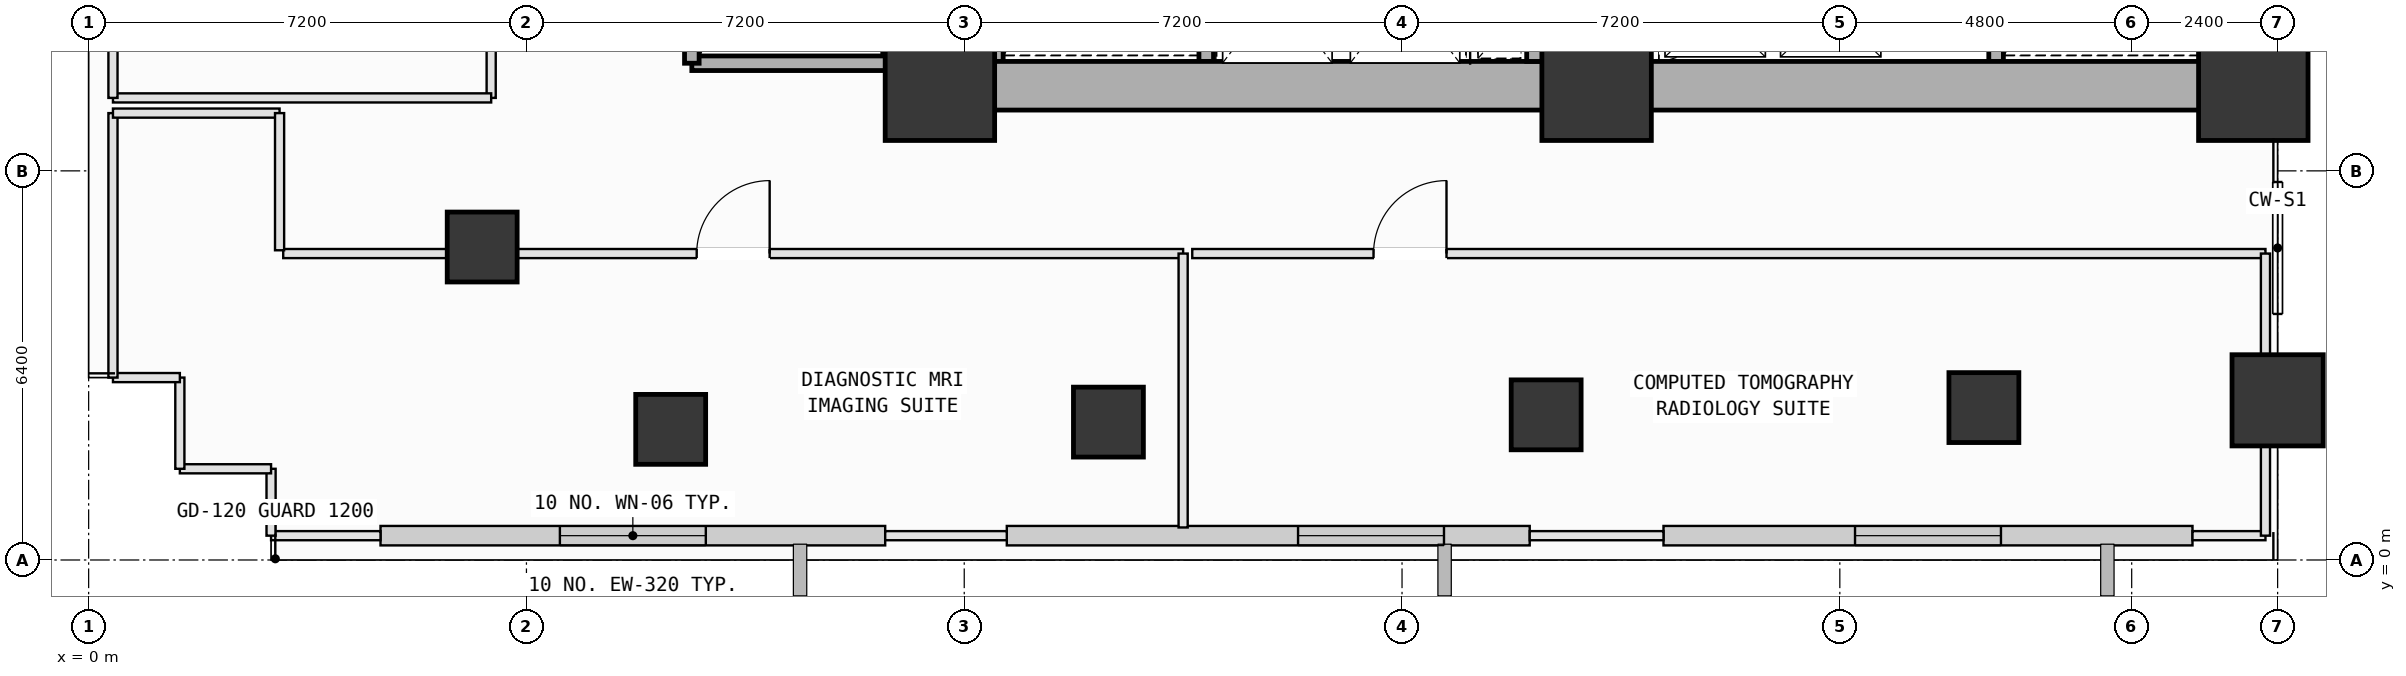
"""IFC4 building model, lengths in metres.
Left out: names, types, materials, properties, quantities, classifications, styles, units other than length and angle.
Written with IfcOpenShell. Run it as: python <this file> out.ifc"""

import sys

from ifc_helpers import new_model, si_unit, direction, frame, frame_2d, origin, origin_2d, place, context, subcontext, project, spatial, rectangle, extrude, element, fill, save


model = new_model("IFC4")
c1 = context("Model", 3, precision=1e-05, world=origin(), true_north=direction((0.0, 1.0)))
c2 = subcontext(c1, "Body", "Model", "MODEL_VIEW")
j1 = project(units=[si_unit("LENGTHUNIT", "METRE"), si_unit("PLANEANGLEUNIT", "RADIAN")], contexts=[c1])
p1 = place(None, origin())
s1 = spatial("IfcSite", under=j1, at=p1, CompositionType="ELEMENT")
p2 = place(p1, origin())
s2 = spatial("IfcBuilding", under=s1, at=p2, CompositionType="ELEMENT")
p3 = place(p2, frame((0.0, 0.0, 10.8)))
s3 = spatial("IfcBuildingStorey", under=s2, at=p3, CompositionType="ELEMENT", Elevation=10.8)
for number, where, z_axis, x_axis in (
    (1, (14.0, 7.8, 0.0), (0.0, 0.0, 1.0), (1.0, 0.0, 0.0)),
    (2, (24.8, 7.8, 0.0), (0.0, 0.0, 1.0), (1.0, 0.0, 0.0)),
    (3, (35.6, 7.8, 0.0), (0.0, 0.0, 1.0), (1.0, 0.0, 0.0)),
):
    element("IfcColumn", number, at=place(p3, frame(where, z_axis=z_axis, x_axis=x_axis)), inside=s3, PredefinedType="COLUMN", context=c2, shape_type="SweptSolid", body=[
        extrude(rectangle(XDim=1.8, YDim=1.8, at=origin_2d()), origin(), (0.0, 0.0, 1.0), 5.4),
    ])
p4 = place(p3, frame((36.0, 2.626, 0.0), z_axis=(0.0, 0.0, 1.0), x_axis=(1.0, 0.0, 0.0)))
e4 = element("IfcColumn", 4, at=p4, inside=s3, PredefinedType="PILASTER", context=c2, shape_type="SweptSolid", body=[
    extrude(rectangle(XDim=1.5, YDim=1.5, at=origin_2d()), origin(), (0.0, 0.0, 1.0), 5.4),
])
for number, where, z_axis, x_axis in (
    (5, (9.572, 2.148, 0.0), (0.0, 0.0, 1.0), (1.0, 0.0, 0.0)),
    (6, (16.771, 2.268, 0.0), (0.0, 0.0, 1.0), (1.0, 0.0, 0.0)),
    (7, (23.97, 2.387, 0.0), (0.0, 0.0, 1.0), (1.0, 0.0, 0.0)),
    (8, (31.169, 2.507, 0.0), (0.0, 0.0, 1.0), (1.0, 0.0, 0.0)),
    (9, (6.472, 5.147, 0.0), (0.0, 0.0, 1.0), (1.0, 0.0, 0.0)),
):
    element("IfcColumn", number, at=place(p3, frame(where, z_axis=z_axis, x_axis=x_axis)), inside=s3, PredefinedType="COLUMN", context=c2, shape_type="SweptSolid", body=[
        extrude(rectangle(XDim=1.15, YDim=1.15, at=origin_2d()), origin(), (0.0, 0.0, 1.0), 5.4),
    ])
p5 = place(p3, frame((13.1, 0.4, 0.0), z_axis=(0.0, 0.0, 1.0), x_axis=(-1.0, 0.0, 0.0)))
e10 = element("IfcWall", 10, at=p5, inside=s3, PredefinedType="SOLIDWALL", context=c2, shape_type="SweptSolid", body=[
    extrude(rectangle(XDim=8.3, YDim=0.32, at=frame_2d((4.15, 0.0))), origin(), (0.0, 0.0, 1.0), 4.23),
])
p6 = place(p5, frame((2.95, 0.0, 0.8)))
e11 = element("IfcOpeningElement", 11, at=p6, cuts=e10, PredefinedType="OPENING", context=c2, shape_type="SweptSolid", body=[
    extrude(rectangle(XDim=2.4, YDim=2.2, at=frame_2d((1.2, 1.1))), frame((0.0, 0.17, 0.0), z_axis=(0.0, -1.0, 0.0), x_axis=(1.0, 0.0, 0.0)), (0.0, 0.0, 1.0), 0.34),
])
p7 = place(p3, frame((23.7, 0.4, 0.0), z_axis=(0.0, 0.0, 1.0), x_axis=(-1.0, 0.0, 0.0)))
e12 = element("IfcWall", 12, at=p7, inside=s3, PredefinedType="SOLIDWALL", context=c2, shape_type="SweptSolid", body=[
    extrude(rectangle(XDim=8.6, YDim=0.32, at=frame_2d((4.3, 0.0))), origin(), (0.0, 0.0, 1.0), 4.23),
])
p8 = place(p7, frame((1.41, 0.0, 0.8)))
e13 = element("IfcOpeningElement", 13, at=p8, cuts=e12, PredefinedType="OPENING", context=c2, shape_type="SweptSolid", body=[
    extrude(rectangle(XDim=2.4, YDim=2.2, at=frame_2d((1.2, 1.1))), frame((0.0, 0.17, 0.0), z_axis=(0.0, -1.0, 0.0), x_axis=(1.0, 0.0, 0.0)), (0.0, 0.0, 1.0), 0.34),
])
p9 = place(p3, frame((34.6, 0.4, 0.0), z_axis=(0.0, 0.0, 1.0), x_axis=(-1.0, 0.0, 0.0)))
e14 = element("IfcWall", 14, at=p9, inside=s3, PredefinedType="SOLIDWALL", context=c2, shape_type="SweptSolid", body=[
    extrude(rectangle(XDim=8.7, YDim=0.32, at=frame_2d((4.35, 0.0))), origin(), (0.0, 0.0, 1.0), 4.23),
])
p10 = place(p9, frame((3.15, 0.0, 0.8)))
e15 = element("IfcOpeningElement", 15, at=p10, cuts=e14, PredefinedType="OPENING", context=c2, shape_type="SweptSolid", body=[
    extrude(rectangle(XDim=2.4, YDim=2.2, at=frame_2d((1.2, 1.1))), frame((0.0, 0.17, 0.0), z_axis=(0.0, -1.0, 0.0), x_axis=(1.0, 0.0, 0.0)), (0.0, 0.0, 1.0), 0.34),
])
for number, where, z_axis, x_axis in (
    (16, (18.38, 15.12, 0.0), (0.0, 0.0, 1.0), (0.0, -1.0, 0.0)),
    (17, (14.92, 8.2, 0.0), (0.0, 0.0, 1.0), (0.0, 1.0, 0.0)),
    (18, (34.83, 15.12, 0.0), (0.0, 0.0, 1.0), (0.0, -1.0, 0.0)),
    (19, (31.37, 8.2, 0.0), (0.0, 0.0, 1.0), (0.0, 1.0, 0.0)),
):
    element("IfcWall", number, at=place(p3, frame(where, z_axis=z_axis, x_axis=x_axis)), inside=s3, PredefinedType="SOLIDWALL", context=c2, shape_type="SweptSolid", body=[
        extrude(rectangle(XDim=6.92, YDim=0.24, at=frame_2d((3.46, 0.0))), origin(), (0.0, 0.0, 1.0), 5.15),
    ])
p11 = place(p3, frame((13.18, 15.22, 0.0), z_axis=(0.0, 0.0, 1.0), x_axis=(0.0, -1.0, 0.0)))
e20 = element("IfcWall", 20, at=p11, inside=s3, PredefinedType="SOLIDWALL", context=c2, shape_type="SweptSolid", body=[
    extrude(rectangle(XDim=7.05, YDim=0.24, at=frame_2d((3.525, 0.0))), origin(), (0.0, 0.0, 1.0), 5.15),
])
p12 = place(p3, frame((13.18, 8.17, 0.0), z_axis=(0.0, 0.0, 1.0), x_axis=(-1.0, 0.0, 0.0)))
e21 = element("IfcWall", 21, at=p12, inside=s3, PredefinedType="SOLIDWALL", context=c2, shape_type="SweptSolid", body=[
    extrude(rectangle(XDim=3.26, YDim=0.24, at=frame_2d((1.63, 0.0))), origin(), (0.0, 0.0, 1.0), 5.15),
])
p13 = place(p3, frame((9.92, 8.17, 0.0), z_axis=(0.0, 0.0, 1.0), x_axis=(0.0, 1.0, 0.0)))
e22 = element("IfcWall", 22, at=p13, inside=s3, PredefinedType="SOLIDWALL", context=c2, shape_type="SweptSolid", body=[
    extrude(rectangle(XDim=7.05, YDim=0.24, at=frame_2d((3.525, 0.0))), origin(), (0.0, 0.0, 1.0), 5.15),
])
for number, where, z_axis, x_axis in (
    (23, (14.0, 7.8, 0.0), (0.0, 0.0, 1.0), (1.0, 0.0, 0.0)),
    (24, (24.8, 7.8, 0.0), (0.0, 0.0, 1.0), (1.0, 0.0, 0.0)),
):
    element("IfcWall", number, at=place(p3, frame(where, z_axis=z_axis, x_axis=x_axis)), inside=s3, PredefinedType="SHEAR", context=c2, shape_type="SweptSolid", body=[
        extrude(rectangle(XDim=10.8, YDim=0.8, at=frame_2d((5.4, 0.0))), origin(), (0.0, 0.0, 1.0), 5.15),
    ])
for number, where, z_axis, x_axis in (
    (25, (35.6, 7.8, 0.0), (0.0, 0.0, 1.0), (0.0, 1.0, 0.0)),
    (26, (14.0, 16.8, 0.0), (0.0, 0.0, 1.0), (0.0, -1.0, 0.0)),
):
    element("IfcWall", number, at=place(p3, frame(where, z_axis=z_axis, x_axis=x_axis)), inside=s3, PredefinedType="SHEAR", context=c2, shape_type="SweptSolid", body=[
        extrude(rectangle(XDim=9.0, YDim=0.8, at=frame_2d((4.5, 0.0))), origin(), (0.0, 0.0, 1.0), 5.15),
    ])
p14 = place(p3, frame((23.8, 8.2, 0.0), z_axis=(0.0, 0.0, 1.0), x_axis=(0.0, 1.0, 0.0)))
e27 = element("IfcWall", 27, at=p14, inside=s3, PredefinedType="SOLIDWALL", context=c2, shape_type="SweptSolid", body=[
    extrude(rectangle(XDim=2.48, YDim=0.3, at=frame_2d((1.24, 0.0))), origin(), (0.0, 0.0, 1.0), 5.15),
])
p15 = place(p3, frame((6.62, 18.45, 0.0), z_axis=(0.0, 0.0, 1.0), x_axis=(0.0, -1.0, 0.0)))
e28 = element("IfcWall", 28, at=p15, inside=s3, PredefinedType="PARTITIONING", context=c2, shape_type="SweptSolid", body=[
    extrude(rectangle(XDim=10.85, YDim=0.15, at=frame_2d((5.425, 0.0))), origin(), (0.0, 0.0, 1.0), 4.235),
])
p16 = place(p15, frame((4.825, 0.0, 0.0)))
e29 = element("IfcOpeningElement", 29, at=p16, cuts=e28, PredefinedType="OPENING", context=c2, shape_type="SweptSolid", body=[
    extrude(rectangle(XDim=1.2, YDim=2.15, at=frame_2d((0.6, 1.075))), frame((0.0, 0.085, 0.0), z_axis=(0.0, -1.0, 0.0), x_axis=(1.0, 0.0, 0.0)), (0.0, 0.0, 1.0), 0.17),
])
p17 = place(p3, frame((6.62, 7.6, 0.0), z_axis=(0.0, 0.0, 1.0), x_axis=(-1.0, 0.0, 0.0)))
e30 = element("IfcWall", 30, at=p17, inside=s3, PredefinedType="PARTITIONING", context=c2, shape_type="SweptSolid", body=[
    extrude(rectangle(XDim=6.22, YDim=0.15, at=frame_2d((3.11, 0.0))), origin(), (0.0, 0.0, 1.0), 5.15),
])
p18 = place(p3, frame((0.4, 7.6, 0.0), z_axis=(0.0, 0.0, 1.0), x_axis=(0.0, 1.0, 0.0)))
e31 = element("IfcWall", 31, at=p18, inside=s3, PredefinedType="PARTITIONING", context=c2, shape_type="SweptSolid", body=[
    extrude(rectangle(XDim=6.0, YDim=0.15, at=frame_2d((3.0, 0.0))), origin(), (0.0, 0.0, 1.0), 5.15),
])
p19 = place(p3, frame((3.2, 5.04, 0.0), z_axis=(0.0, 0.0, 1.0), x_axis=(1.0, 0.0, 0.0)))
e32 = element("IfcWall", 32, at=p19, inside=s3, PredefinedType="PARTITIONING", context=c2, shape_type="SweptSolid", body=[
    extrude(rectangle(XDim=14.8, YDim=0.15, at=frame_2d((7.4, 0.0))), origin(), (0.0, 0.0, 1.0), 4.235),
])
p20 = place(p19, frame((6.8, 0.0, 0.0)))
e33 = element("IfcOpeningElement", 33, at=p20, cuts=e32, PredefinedType="OPENING", context=c2, shape_type="SweptSolid", body=[
    extrude(rectangle(XDim=1.2, YDim=2.15, at=frame_2d((0.6, 1.075))), frame((0.0, 0.085, 0.0), z_axis=(0.0, -1.0, 0.0), x_axis=(1.0, 0.0, 0.0)), (0.0, 0.0, 1.0), 0.17),
])
p21 = place(p3, frame((18.0, 5.04, 0.0), z_axis=(0.0, 0.0, 1.0), x_axis=(0.0, -1.0, 0.0)))
e34 = element("IfcWall", 34, at=p21, inside=s3, PredefinedType="PARTITIONING", context=c2, shape_type="SweptSolid", body=[
    extrude(rectangle(XDim=4.505, YDim=0.15, at=frame_2d((2.252, 0.0))), origin(), (0.0, 0.0, 1.0), 5.15),
])
p22 = place(p3, frame((15.1, 0.4, 0.0), z_axis=(0.0, 0.0, 1.0), x_axis=(-1.0, 0.0, 0.0)))
e35 = element("IfcWall", 35, at=p22, inside=s3, PredefinedType="PARTITIONING", context=c2, shape_type="SweptSolid", body=[
    extrude(rectangle(XDim=2.0, YDim=0.15, at=frame_2d((1.0, 0.0))), origin(), (0.0, 0.0, 1.0), 5.15),
])
p23 = place(p3, frame((4.8, 0.4, 0.0), z_axis=(0.0, 0.0, 1.0), x_axis=(-1.0, 0.0, 0.0)))
e36 = element("IfcWall", 36, at=p23, inside=s3, PredefinedType="PARTITIONING", context=c2, shape_type="SweptSolid", body=[
    extrude(rectangle(XDim=1.8, YDim=0.15, at=frame_2d((0.9, 0.0))), origin(), (0.0, 0.0, 1.0), 5.15),
])
p24 = place(p3, frame((3.0, 0.4, 0.0), z_axis=(0.0, 0.0, 1.0), x_axis=(0.0, 1.0, 0.0)))
e37 = element("IfcWall", 37, at=p24, inside=s3, PredefinedType="PARTITIONING", context=c2, shape_type="SweptSolid", body=[
    extrude(rectangle(XDim=1.1, YDim=0.15, at=frame_2d((0.55, 0.0))), origin(), (0.0, 0.0, 1.0), 5.15),
])
for number, where, z_axis, x_axis in (
    (38, (3.0, 1.5, 0.0), (0.0, 0.0, 1.0), (-1.0, 0.0, 0.0)),
    (39, (1.5, 1.5, 0.0), (0.0, 0.0, 1.0), (0.0, 1.0, 0.0)),
):
    element("IfcWall", number, at=place(p3, frame(where, z_axis=z_axis, x_axis=x_axis)), inside=s3, PredefinedType="PARTITIONING", context=c2, shape_type="SweptSolid", body=[
        extrude(rectangle(XDim=1.5, YDim=0.15, at=frame_2d((0.75, 0.0))), origin(), (0.0, 0.0, 1.0), 5.15),
    ])
p25 = place(p3, frame((1.5, 3.0, 0.0), z_axis=(0.0, 0.0, 1.0), x_axis=(-1.0, 0.0, 0.0)))
e40 = element("IfcWall", 40, at=p25, inside=s3, PredefinedType="PARTITIONING", context=c2, shape_type="SweptSolid", body=[
    extrude(rectangle(XDim=1.1, YDim=0.15, at=frame_2d((0.55, 0.0))), origin(), (0.0, 0.0, 1.0), 5.15),
])
p26 = place(p3, frame((0.4, 3.0, 0.0), z_axis=(0.0, 0.0, 1.0), x_axis=(0.0, 1.0, 0.0)))
e41 = element("IfcWall", 41, at=p26, inside=s3, PredefinedType="PARTITIONING", context=c2, shape_type="SweptSolid", body=[
    extrude(rectangle(XDim=4.35, YDim=0.15, at=frame_2d((2.175, 0.0))), origin(), (0.0, 0.0, 1.0), 5.15),
])
p27 = place(p3, frame((0.4, 7.35, 0.0), z_axis=(0.0, 0.0, 1.0), x_axis=(1.0, 0.0, 0.0)))
e42 = element("IfcWall", 42, at=p27, inside=s3, PredefinedType="PARTITIONING", context=c2, shape_type="SweptSolid", body=[
    extrude(rectangle(XDim=2.74, YDim=0.15, at=frame_2d((1.37, 0.0))), origin(), (0.0, 0.0, 1.0), 5.15),
])
p28 = place(p3, frame((3.14, 7.35, 0.0), z_axis=(0.0, 0.0, 1.0), x_axis=(0.0, -1.0, 0.0)))
e43 = element("IfcWall", 43, at=p28, inside=s3, PredefinedType="PARTITIONING", context=c2, shape_type="SweptSolid", body=[
    extrude(rectangle(XDim=2.256, YDim=0.15, at=frame_2d((1.128, 0.0))), origin(), (0.0, 0.0, 1.0), 5.15),
])
p29 = place(p3, frame((35.8, 0.4, 0.0), z_axis=(0.0, 0.0, 1.0), x_axis=(-1.0, 0.0, 0.0)))
e44 = element("IfcWall", 44, at=p29, inside=s3, PredefinedType="PARTITIONING", context=c2, shape_type="SweptSolid", body=[
    extrude(rectangle(XDim=1.2, YDim=0.15, at=frame_2d((0.6, 0.0))), origin(), (0.0, 0.0, 1.0), 5.15),
])
p30 = place(p3, frame((25.9, 0.4, 0.0), z_axis=(0.0, 0.0, 1.0), x_axis=(-1.0, 0.0, 0.0)))
e45 = element("IfcWall", 45, at=p30, inside=s3, PredefinedType="PARTITIONING", context=c2, shape_type="SweptSolid", body=[
    extrude(rectangle(XDim=2.2, YDim=0.15, at=frame_2d((1.1, 0.0))), origin(), (0.0, 0.0, 1.0), 5.15),
])
p31 = place(p3, frame((18.15, 5.04, 0.0), z_axis=(0.0, 0.0, 1.0), x_axis=(1.0, 0.0, 0.0)))
e46 = element("IfcWall", 46, at=p31, inside=s3, PredefinedType="PARTITIONING", context=c2, shape_type="SweptSolid", body=[
    extrude(rectangle(XDim=17.65, YDim=0.15, at=frame_2d((8.825, 0.0))), origin(), (0.0, 0.0, 1.0), 5.15),
])
p32 = place(p31, frame((2.981, 0.0, 0.0)))
e47 = element("IfcOpeningElement", 47, at=p32, cuts=e46, PredefinedType="OPENING", context=c2, shape_type="SweptSolid", body=[
    extrude(rectangle(XDim=1.2, YDim=2.15, at=frame_2d((0.6, 1.075))), frame((0.0, 0.085, 0.0), z_axis=(0.0, -1.0, 0.0), x_axis=(1.0, 0.0, 0.0)), (0.0, 0.0, 1.0), 0.17),
])
p33 = place(p3, frame((35.8, 5.04, 0.0), z_axis=(0.0, 0.0, 1.0), x_axis=(0.0, -1.0, 0.0)))
e48 = element("IfcWall", 48, at=p33, inside=s3, PredefinedType="PARTITIONING", context=c2, shape_type="SweptSolid", body=[
    extrude(rectangle(XDim=4.64, YDim=0.15, at=frame_2d((2.32, 0.0))), origin(), (0.0, 0.0, 1.0), 4.235),
])
p34 = place(p6, origin())
e49 = element("IfcWindow", 49, at=p34, inside=s3, PartitioningType="SINGLE_PANEL", PredefinedType="WINDOW", context=c2, shape_type="SweptSolid", body=[
    extrude(rectangle(XDim=2.4, YDim=2.2, at=frame_2d((1.2, 1.1))), frame((0.0, 0.03, 0.0), z_axis=(0.0, -1.0, 0.0), x_axis=(1.0, 0.0, 0.0)), (0.0, 0.0, 1.0), 0.06),
])
fill(e11, e49)
p35 = place(p8, origin())
e50 = element("IfcWindow", 50, at=p35, inside=s3, PartitioningType="SINGLE_PANEL", PredefinedType="WINDOW", context=c2, shape_type="SweptSolid", body=[
    extrude(rectangle(XDim=2.4, YDim=2.2, at=frame_2d((1.2, 1.1))), frame((0.0, 0.03, 0.0), z_axis=(0.0, -1.0, 0.0), x_axis=(1.0, 0.0, 0.0)), (0.0, 0.0, 1.0), 0.06),
])
fill(e13, e50)
p36 = place(p10, origin())
e51 = element("IfcWindow", 51, at=p36, inside=s3, PartitioningType="SINGLE_PANEL", PredefinedType="WINDOW", context=c2, shape_type="SweptSolid", body=[
    extrude(rectangle(XDim=2.4, YDim=2.2, at=frame_2d((1.2, 1.1))), frame((0.0, 0.03, 0.0), z_axis=(0.0, -1.0, 0.0), x_axis=(1.0, 0.0, 0.0)), (0.0, 0.0, 1.0), 0.06),
])
fill(e15, e51)
p37 = place(p20, origin())
e52 = element("IfcDoor", 52, at=p37, inside=s3, OperationType="SINGLE_SWING_RIGHT", PredefinedType="DOOR", context=c2, shape_type="SweptSolid", body=[
    extrude(rectangle(XDim=1.2, YDim=2.15, at=frame_2d((0.6, 1.075))), frame((0.0, 0.025, 0.0), z_axis=(0.0, -1.0, 0.0), x_axis=(1.0, 0.0, 0.0)), (0.0, 0.0, 1.0), 0.05),
])
fill(e33, e52)
p38 = place(p32, origin())
e53 = element("IfcDoor", 53, at=p38, inside=s3, OperationType="SINGLE_SWING_RIGHT", PredefinedType="DOOR", context=c2, shape_type="SweptSolid", body=[
    extrude(rectangle(XDim=1.2, YDim=2.15, at=frame_2d((0.6, 1.075))), frame((0.0, 0.025, 0.0), z_axis=(0.0, -1.0, 0.0), x_axis=(1.0, 0.0, 0.0)), (0.0, 0.0, 1.0), 0.05),
])
fill(e47, e53)
save(model, sys.argv[1])
